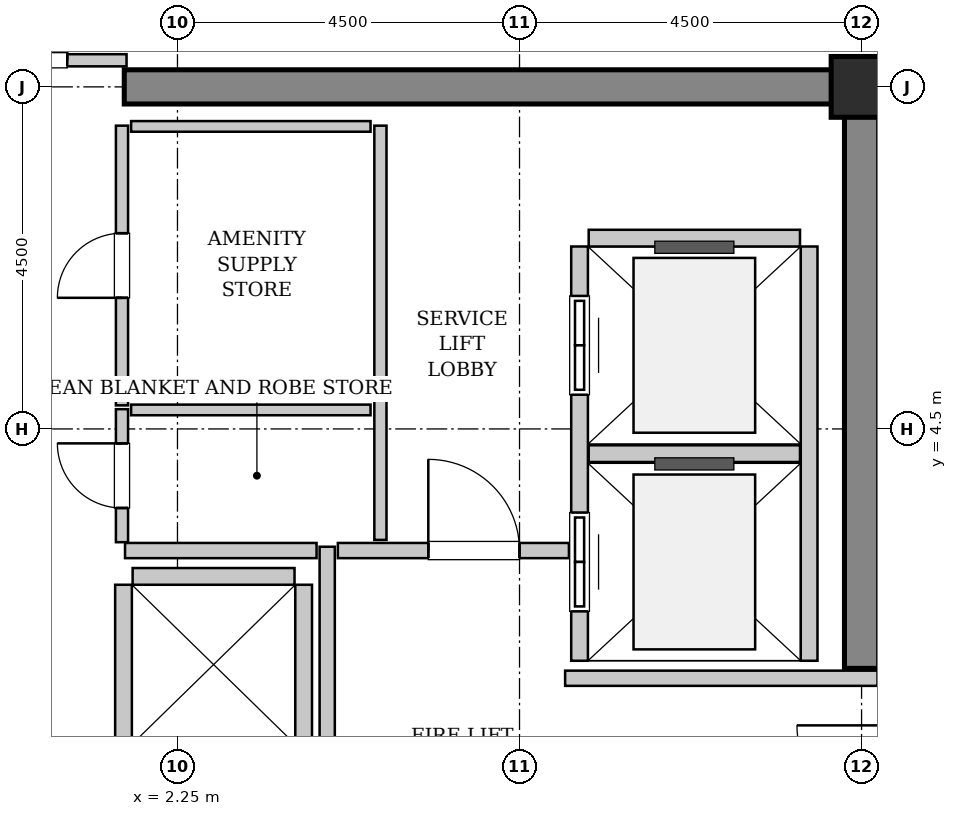
"""IFC4 building model, lengths in metres.
Left out: names, types, materials, properties, quantities, classifications, styles, units other than length and angle.
Written with IfcOpenShell. Run it as: python <this file> out.ifc"""

import sys

from ifc_helpers import new_model, si_unit, direction, frame, frame_2d, origin, origin_2d, place, context, subcontext, project, spatial, rectangle, hollow_rectangle, extrude, source, transform, mapped, element, fill, save


model = new_model("IFC4")
c1 = context("Model", 3, precision=1e-05, world=origin(), true_north=direction((0.0, 1.0)))
c2 = subcontext(c1, "Body", "Model", "MODEL_VIEW")
j1 = project(units=[si_unit("LENGTHUNIT", "METRE"), si_unit("PLANEANGLEUNIT", "RADIAN")], contexts=[c1])
p1 = place(None, origin())
s1 = spatial("IfcSite", under=j1, at=p1, CompositionType="ELEMENT")
p2 = place(p1, origin())
s2 = spatial("IfcBuilding", under=s1, at=p2, CompositionType="ELEMENT")
p3 = place(p2, frame((0.0, 0.0, 298.8)))
s3 = spatial("IfcBuildingStorey", under=s2, at=p3, CompositionType="ELEMENT", Elevation=298.8)
m1 = source(origin(), c2, "Body", "SweptSolid", [
    extrude(rectangle(XDim=9.925, YDim=0.45, at=frame_2d((4.962, 0.0))), origin(), (0.0, 0.0, 1.0), 3.8),
])
p4 = place(p3, frame((1.55, 9.0, 0.0), z_axis=(0.0, 0.0, 1.0), x_axis=(1.0, 0.0, 0.0)))
e1 = element("IfcWall", 1, at=p4, inside=s3, PredefinedType="SHEAR", context=c2, shape_type="MappedRepresentation", body=[
    mapped(m1, transform((0.0, 0.0, 0.0), x_axis=(1.0, 0.0, 0.0), y_axis=(0.0, 1.0, 0.0), z_axis=(0.0, 0.0, 1.0), scale=1.0)),
])
m2 = source(origin(), c2, "Body", "SweptSolid", [
    extrude(rectangle(XDim=7.425, YDim=0.45, at=frame_2d((3.712, 0.0))), origin(), (0.0, 0.0, 1.0), 3.8),
])
p5 = place(p3, frame((11.25, 1.35, 0.0), z_axis=(0.0, 0.0, 1.0), x_axis=(0.0, 1.0, 0.0)))
e2 = element("IfcWall", 2, at=p5, inside=s3, PredefinedType="SHEAR", context=c2, shape_type="MappedRepresentation", body=[
    mapped(m2, transform((0.0, 0.0, 0.0), x_axis=(1.0, 0.0, 0.0), y_axis=(0.0, 1.0, 0.0), z_axis=(0.0, 0.0, 1.0), scale=1.0)),
])
m3 = source(origin(), c2, "Body", "SweptSolid", [
    extrude(hollow_rectangle(XDim=0.8, YDim=0.8, WallThickness=0.04, InnerFilletRadius=0.04, OuterFilletRadius=0.08, at=origin_2d()), origin(), (0.0, 0.0, 1.0), 3.8),
])
p6 = place(p3, frame((11.25, 9.0, 0.0), z_axis=(0.0, 0.0, 1.0), x_axis=(1.0, 0.0, 0.0)))
e3 = element("IfcColumn", 3, at=p6, inside=s3, PredefinedType="COLUMN", context=c2, shape_type="MappedRepresentation", body=[
    mapped(m3, transform((0.0, 0.0, 0.0), x_axis=(1.0, 0.0, 0.0), y_axis=(0.0, 1.0, 0.0), z_axis=(0.0, 0.0, 1.0), scale=1.0)),
])
m4 = source(origin(), c2, "Body", "SweptSolid", [
    extrude(rectangle(XDim=5.45, YDim=0.22, at=frame_2d((2.725, 0.0))), origin(), (0.0, 0.0, 1.0), 3.535),
])
p7 = place(p3, frame((7.54, 6.9, 0.0), z_axis=(0.0, 0.0, 1.0), x_axis=(0.0, -1.0, 0.0)))
e4 = element("IfcWall", 4, at=p7, inside=s3, PredefinedType="SOLIDWALL", context=c2, shape_type="MappedRepresentation", body=[
    mapped(m4, transform((0.0, 0.0, 0.0), x_axis=(1.0, 0.0, 0.0), y_axis=(0.0, 1.0, 0.0), z_axis=(0.0, 0.0, 1.0), scale=1.0)),
])
p8 = place(p7, frame((3.5, 0.0, 0.0)))
e5 = element("IfcOpeningElement", 5, at=p8, cuts=e4, PredefinedType="OPENING", context=c2, shape_type="SweptSolid", body=[
    extrude(rectangle(XDim=1.3, YDim=2.3, at=frame_2d((0.65, 1.15))), frame((0.0, 0.12, 0.0), z_axis=(0.0, -1.0, 0.0), x_axis=(1.0, 0.0, 0.0)), (0.0, 0.0, 1.0), 0.24),
])
p9 = place(p7, frame((0.65, 0.0, 0.0)))
e6 = element("IfcOpeningElement", 6, at=p9, cuts=e4, PredefinedType="OPENING", context=c2, shape_type="SweptSolid", body=[
    extrude(rectangle(XDim=1.3, YDim=2.3, at=frame_2d((0.65, 1.15))), frame((0.0, 0.12, 0.0), z_axis=(0.0, -1.0, 0.0), x_axis=(1.0, 0.0, 0.0)), (0.0, 0.0, 1.0), 0.24),
])
p10 = place(p3, frame((10.56, 1.45, 0.0), z_axis=(0.0, 0.0, 1.0), x_axis=(0.0, 1.0, 0.0)))
e7 = element("IfcWall", 7, at=p10, inside=s3, PredefinedType="SOLIDWALL", context=c2, shape_type="MappedRepresentation", body=[
    mapped(m4, transform((0.0, 0.0, 0.0), x_axis=(1.0, 0.0, 0.0), y_axis=(0.0, 1.0, 0.0), z_axis=(0.0, 0.0, 1.0), scale=1.0)),
])
m5 = source(origin(), c2, "Body", "SweptSolid", [
    extrude(rectangle(XDim=2.78, YDim=0.22, at=frame_2d((1.39, 0.0))), origin(), (0.0, 0.0, 1.0), 3.535),
])
for number, where, z_axis, x_axis in (
    (8, (7.66, 4.175, 0.0), (0.0, 0.0, 1.0), (1.0, 0.0, 0.0)),
    (9, (10.44, 7.01, 0.0), (0.0, 0.0, 1.0), (-1.0, 0.0, 0.0)),
):
    element("IfcWall", number, at=place(p3, frame(where, z_axis=z_axis, x_axis=x_axis)), inside=s3, PredefinedType="SOLIDWALL", context=c2, shape_type="MappedRepresentation", body=[
        mapped(m5, transform((0.0, 0.0, 0.0), x_axis=(1.0, 0.0, 0.0), y_axis=(0.0, 1.0, 0.0), z_axis=(0.0, 0.0, 1.0), scale=1.0)),
    ])
m6 = source(origin(), c2, "Body", "SweptSolid", [
    extrude(rectangle(XDim=4.9, YDim=0.22, at=frame_2d((2.45, 0.0))), origin(), (0.0, 0.0, 1.0), 3.535),
])
for number, where, z_axis, x_axis in (
    (10, (1.54, 2.45, 0.0), (0.0, 0.0, 1.0), (0.0, -1.0, 0.0)),
    (11, (3.91, -2.45, 0.0), (0.0, 0.0, 1.0), (0.0, 1.0, 0.0)),
):
    element("IfcWall", number, at=place(p3, frame(where, z_axis=z_axis, x_axis=x_axis)), inside=s3, PredefinedType="SOLIDWALL", context=c2, shape_type="MappedRepresentation", body=[
        mapped(m6, transform((0.0, 0.0, 0.0), x_axis=(1.0, 0.0, 0.0), y_axis=(0.0, 1.0, 0.0), z_axis=(0.0, 0.0, 1.0), scale=1.0)),
    ])
m7 = source(origin(), c2, "Body", "SweptSolid", [
    extrude(rectangle(XDim=2.13, YDim=0.22, at=frame_2d((1.065, 0.0))), origin(), (0.0, 0.0, 1.0), 3.535),
])
p11 = place(p3, frame((3.79, 2.56, 0.0), z_axis=(0.0, 0.0, 1.0), x_axis=(-1.0, 0.0, 0.0)))
e12 = element("IfcWall", 12, at=p11, inside=s3, PredefinedType="SOLIDWALL", context=c2, shape_type="MappedRepresentation", body=[
    mapped(m7, transform((0.0, 0.0, 0.0), x_axis=(1.0, 0.0, 0.0), y_axis=(0.0, 1.0, 0.0), z_axis=(0.0, 0.0, 1.0), scale=1.0)),
])
m8 = source(origin(), c2, "Body", "SweptSolid", [
    extrude(rectangle(XDim=5.9, YDim=0.2, at=frame_2d((2.95, 0.0))), origin(), (0.0, 0.0, 1.0), 3.535),
])
p12 = place(p3, frame((4.22, -2.95, 0.0), z_axis=(0.0, 0.0, 1.0), x_axis=(0.0, 1.0, 0.0)))
e13 = element("IfcWall", 13, at=p12, inside=s3, PredefinedType="PARTITIONING", context=c2, shape_type="MappedRepresentation", body=[
    mapped(m8, transform((0.0, 0.0, 0.0), x_axis=(1.0, 0.0, 0.0), y_axis=(0.0, 1.0, 0.0), z_axis=(0.0, 0.0, 1.0), scale=1.0)),
])
m9 = source(origin(), c2, "Body", "SweptSolid", [
    extrude(rectangle(XDim=2.52, YDim=0.2, at=frame_2d((1.26, 0.0))), origin(), (0.0, 0.0, 1.0), 3.535),
])
p13 = place(p3, frame((1.56, 2.9, 0.0), z_axis=(0.0, 0.0, 1.0), x_axis=(1.0, 0.0, 0.0)))
e14 = element("IfcWall", 14, at=p13, inside=s3, PredefinedType="PARTITIONING", context=c2, shape_type="MappedRepresentation", body=[
    mapped(m9, transform((0.0, 0.0, 0.0), x_axis=(1.0, 0.0, 0.0), y_axis=(0.0, 1.0, 0.0), z_axis=(0.0, 0.0, 1.0), scale=1.0)),
])
m10 = source(origin(), c2, "Body", "SweptSolid", [
    extrude(rectangle(XDim=3.04, YDim=0.2, at=frame_2d((1.52, 0.0))), origin(), (0.0, 0.0, 1.0), 3.535),
])
p14 = place(p3, frame((4.36, 2.9, 0.0), z_axis=(0.0, 0.0, 1.0), x_axis=(1.0, 0.0, 0.0)))
e15 = element("IfcWall", 15, at=p14, inside=s3, PredefinedType="PARTITIONING", context=c2, shape_type="MappedRepresentation", body=[
    mapped(m10, transform((0.0, 0.0, 0.0), x_axis=(1.0, 0.0, 0.0), y_axis=(0.0, 1.0, 0.0), z_axis=(0.0, 0.0, 1.0), scale=1.0)),
])
p15 = place(p14, frame((1.19, 0.0, 0.0)))
e16 = element("IfcOpeningElement", 16, at=p15, cuts=e15, PredefinedType="OPENING", context=c2, shape_type="SweptSolid", body=[
    extrude(rectangle(XDim=1.2, YDim=2.15, at=frame_2d((0.6, 1.075))), frame((0.0, 0.11, 0.0), z_axis=(0.0, -1.0, 0.0), x_axis=(1.0, 0.0, 0.0)), (0.0, 0.0, 1.0), 0.22),
])
m11 = source(origin(), c2, "Body", "SweptSolid", [
    extrude(rectangle(XDim=4.11, YDim=0.2, at=frame_2d((2.055, 0.0))), origin(), (0.0, 0.0, 1.0), 3.535),
])
p16 = place(p3, frame((7.35, 1.22, 0.0), z_axis=(0.0, 0.0, 1.0), x_axis=(1.0, 0.0, 0.0)))
e17 = element("IfcWall", 17, at=p16, inside=s3, PredefinedType="PARTITIONING", context=c2, shape_type="MappedRepresentation", body=[
    mapped(m11, transform((0.0, 0.0, 0.0), x_axis=(1.0, 0.0, 0.0), y_axis=(0.0, 1.0, 0.0), z_axis=(0.0, 0.0, 1.0), scale=1.0)),
])
m12 = source(origin(), c2, "Body", "SweptSolid", [
    extrude(rectangle(XDim=3.16, YDim=0.16, at=frame_2d((1.58, 0.0))), origin(), (0.0, 0.0, 1.0), 2.625),
])
p17 = place(p3, frame((-1.58, 9.35, 0.0), z_axis=(0.0, 0.0, 1.0), x_axis=(1.0, 0.0, 0.0)))
e18 = element("IfcWall", 18, at=p17, inside=s3, PredefinedType="PARTITIONING", context=c2, shape_type="MappedRepresentation", body=[
    mapped(m12, transform((0.0, 0.0, 0.0), x_axis=(1.0, 0.0, 0.0), y_axis=(0.0, 1.0, 0.0), z_axis=(0.0, 0.0, 1.0), scale=1.0)),
])
p18 = place(p17, frame((0.78, 0.0, 0.0)))
e19 = element("IfcOpeningElement", 19, at=p18, cuts=e18, PredefinedType="OPENING", context=c2, shape_type="SweptSolid", body=[
    extrude(rectangle(XDim=1.6, YDim=2.3, at=frame_2d((0.8, 1.15))), frame((0.0, 0.09, 0.0), z_axis=(0.0, -1.0, 0.0), x_axis=(1.0, 0.0, 0.0)), (0.0, 0.0, 1.0), 0.18),
])
m13 = source(origin(), c2, "Body", "SweptSolid", [
    extrude(rectangle(XDim=5.45, YDim=0.16, at=frame_2d((2.725, 0.0))), origin(), (0.0, 0.0, 1.0), 3.535),
])
p19 = place(p3, frame((4.92, 3.04, 0.0), z_axis=(0.0, 0.0, 1.0), x_axis=(0.0, 1.0, 0.0)))
e20 = element("IfcWall", 20, at=p19, inside=s3, PredefinedType="PARTITIONING", context=c2, shape_type="MappedRepresentation", body=[
    mapped(m13, transform((0.0, 0.0, 0.0), x_axis=(1.0, 0.0, 0.0), y_axis=(0.0, 1.0, 0.0), z_axis=(0.0, 0.0, 1.0), scale=1.0)),
])
m14 = source(origin(), c2, "Body", "SweptSolid", [
    extrude(rectangle(XDim=1.75, YDim=0.16, at=frame_2d((0.875, 0.0))), origin(), (0.0, 0.0, 1.0), 3.535),
])
p20 = place(p3, frame((1.52, 3.01, 0.0), z_axis=(0.0, 0.0, 1.0), x_axis=(0.0, 1.0, 0.0)))
e21 = element("IfcWall", 21, at=p20, inside=s3, PredefinedType="PARTITIONING", context=c2, shape_type="MappedRepresentation", body=[
    mapped(m14, transform((0.0, 0.0, 0.0), x_axis=(1.0, 0.0, 0.0), y_axis=(0.0, 1.0, 0.0), z_axis=(0.0, 0.0, 1.0), scale=1.0)),
])
p21 = place(p20, frame((0.45, 0.0, 0.0)))
e22 = element("IfcOpeningElement", 22, at=p21, cuts=e21, PredefinedType="OPENING", context=c2, shape_type="SweptSolid", body=[
    extrude(rectangle(XDim=0.85, YDim=2.1, at=frame_2d((0.425, 1.05))), frame((0.0, 0.09, 0.0), z_axis=(0.0, -1.0, 0.0), x_axis=(1.0, 0.0, 0.0)), (0.0, 0.0, 1.0), 0.18),
])
m15 = source(origin(), c2, "Body", "SweptSolid", [
    extrude(rectangle(XDim=3.15, YDim=0.14, at=frame_2d((1.575, 0.0))), origin(), (0.0, 0.0, 1.0), 3.535),
])
p22 = place(p3, frame((1.64, 4.75, 0.0), z_axis=(0.0, 0.0, 1.0), x_axis=(1.0, 0.0, 0.0)))
e23 = element("IfcWall", 23, at=p22, inside=s3, PredefinedType="PARTITIONING", context=c2, shape_type="MappedRepresentation", body=[
    mapped(m15, transform((0.0, 0.0, 0.0), x_axis=(1.0, 0.0, 0.0), y_axis=(0.0, 1.0, 0.0), z_axis=(0.0, 0.0, 1.0), scale=1.0)),
])
m16 = source(origin(), c2, "Body", "SweptSolid", [
    extrude(rectangle(XDim=3.68, YDim=0.16, at=frame_2d((1.84, 0.0))), origin(), (0.0, 0.0, 1.0), 3.535),
])
p23 = place(p3, frame((1.52, 4.81, 0.0), z_axis=(0.0, 0.0, 1.0), x_axis=(0.0, 1.0, 0.0)))
e24 = element("IfcWall", 24, at=p23, inside=s3, PredefinedType="PARTITIONING", context=c2, shape_type="MappedRepresentation", body=[
    mapped(m16, transform((0.0, 0.0, 0.0), x_axis=(1.0, 0.0, 0.0), y_axis=(0.0, 1.0, 0.0), z_axis=(0.0, 0.0, 1.0), scale=1.0)),
])
p24 = place(p23, frame((1.415, 0.0, 0.0)))
e25 = element("IfcOpeningElement", 25, at=p24, cuts=e24, PredefinedType="OPENING", context=c2, shape_type="SweptSolid", body=[
    extrude(rectangle(XDim=0.85, YDim=2.1, at=frame_2d((0.425, 1.05))), frame((0.0, 0.09, 0.0), z_axis=(0.0, -1.0, 0.0), x_axis=(1.0, 0.0, 0.0)), (0.0, 0.0, 1.0), 0.18),
])
p25 = place(p3, frame((1.64, 8.48, 0.0), z_axis=(0.0, 0.0, 1.0), x_axis=(1.0, 0.0, 0.0)))
e26 = element("IfcWall", 26, at=p25, inside=s3, PredefinedType="PARTITIONING", context=c2, shape_type="MappedRepresentation", body=[
    mapped(m15, transform((0.0, 0.0, 0.0), x_axis=(1.0, 0.0, 0.0), y_axis=(0.0, 1.0, 0.0), z_axis=(0.0, 0.0, 1.0), scale=1.0)),
])
m17 = source(origin(), c2, "Body", "SweptSolid", [
    extrude(rectangle(XDim=1.3, YDim=2.3, at=frame_2d((0.65, 1.15))), frame((0.0, 0.025, 0.0), z_axis=(0.0, -1.0, 0.0), x_axis=(1.0, 0.0, 0.0)), (0.0, 0.0, 1.0), 0.05),
])
p26 = place(p8, origin())
e27 = element("IfcDoor", 27, at=p26, inside=s3, OperationType="SLIDING_TO_RIGHT", PredefinedType="DOOR", context=c2, shape_type="MappedRepresentation", body=[
    mapped(m17, transform((0.0, 0.0, 0.0), x_axis=(1.0, 0.0, 0.0), y_axis=(0.0, 1.0, 0.0), z_axis=(0.0, 0.0, 1.0), scale=1.0)),
])
fill(e5, e27)
p27 = place(p9, origin())
e28 = element("IfcDoor", 28, at=p27, inside=s3, OperationType="SLIDING_TO_RIGHT", PredefinedType="DOOR", context=c2, shape_type="MappedRepresentation", body=[
    mapped(m17, transform((0.0, 0.0, 0.0), x_axis=(1.0, 0.0, 0.0), y_axis=(0.0, 1.0, 0.0), z_axis=(0.0, 0.0, 1.0), scale=1.0)),
])
fill(e6, e28)
m18 = source(origin(), c2, "Body", "SweptSolid", [
    extrude(rectangle(XDim=1.2, YDim=2.15, at=frame_2d((0.6, 1.075))), frame((0.0, 0.025, 0.0), z_axis=(0.0, -1.0, 0.0), x_axis=(1.0, 0.0, 0.0)), (0.0, 0.0, 1.0), 0.05),
])
p28 = place(p15, origin())
e29 = element("IfcDoor", 29, at=p28, inside=s3, OperationType="SINGLE_SWING_LEFT", PredefinedType="DOOR", context=c2, shape_type="MappedRepresentation", body=[
    mapped(m18, transform((0.0, 0.0, 0.0), x_axis=(1.0, 0.0, 0.0), y_axis=(0.0, 1.0, 0.0), z_axis=(0.0, 0.0, 1.0), scale=1.0)),
])
fill(e16, e29)
m19 = source(origin(), c2, "Body", "SweptSolid", [
    extrude(rectangle(XDim=1.6, YDim=2.3, at=frame_2d((0.8, 1.15))), frame((0.0, 0.025, 0.0), z_axis=(0.0, -1.0, 0.0), x_axis=(1.0, 0.0, 0.0)), (0.0, 0.0, 1.0), 0.05),
])
p29 = place(p18, origin())
e30 = element("IfcDoor", 30, at=p29, inside=s3, OperationType="DOUBLE_DOOR_SINGLE_SWING", PredefinedType="DOOR", context=c2, shape_type="MappedRepresentation", body=[
    mapped(m19, transform((0.0, 0.0, 0.0), x_axis=(1.0, 0.0, 0.0), y_axis=(0.0, 1.0, 0.0), z_axis=(0.0, 0.0, 1.0), scale=1.0)),
])
fill(e19, e30)
m20 = source(origin(), c2, "Body", "SweptSolid", [
    extrude(rectangle(XDim=0.85, YDim=2.1, at=frame_2d((0.425, 1.05))), frame((0.0, 0.025, 0.0), z_axis=(0.0, -1.0, 0.0), x_axis=(1.0, 0.0, 0.0)), (0.0, 0.0, 1.0), 0.05),
])
p30 = place(p21, origin())
e31 = element("IfcDoor", 31, at=p30, inside=s3, OperationType="SINGLE_SWING_RIGHT", PredefinedType="DOOR", context=c2, shape_type="MappedRepresentation", body=[
    mapped(m20, transform((0.0, 0.0, 0.0), x_axis=(1.0, 0.0, 0.0), y_axis=(0.0, 1.0, 0.0), z_axis=(0.0, 0.0, 1.0), scale=1.0)),
])
fill(e22, e31)
p31 = place(p24, origin())
e32 = element("IfcDoor", 32, at=p31, inside=s3, OperationType="SINGLE_SWING_LEFT", PredefinedType="DOOR", context=c2, shape_type="MappedRepresentation", body=[
    mapped(m20, transform((0.0, 0.0, 0.0), x_axis=(1.0, 0.0, 0.0), y_axis=(0.0, 1.0, 0.0), z_axis=(0.0, 0.0, 1.0), scale=1.0)),
])
fill(e25, e32)
save(model, sys.argv[1])
